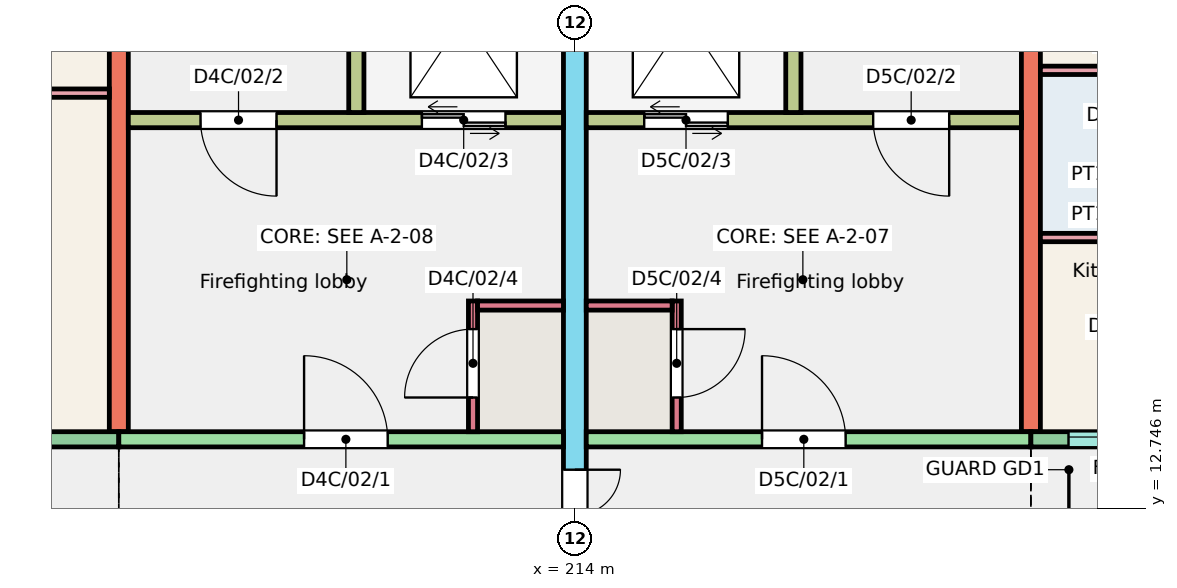
"""IFC4 building model, lengths in metres.
Left out: names, types, materials, properties, quantities, classifications, styles, units other than length and angle.
Written with IfcOpenShell. Run it as: python <this file> out.ifc"""

import sys

from ifc_helpers import new_model, si_unit, direction, frame, frame_2d, origin, place, context, subcontext, project, spatial, rectangle, extrude, element, fill, save


model = new_model("IFC4")
c1 = context("Model", 3, precision=1e-05, world=origin(), true_north=direction((0.0, 1.0)))
c2 = subcontext(c1, "Body", "Model", "MODEL_VIEW")
j1 = project(units=[si_unit("LENGTHUNIT", "METRE"), si_unit("PLANEANGLEUNIT", "RADIAN")], contexts=[c1])
p1 = place(None, origin())
s1 = spatial("IfcSite", under=j1, at=p1, CompositionType="ELEMENT")
p2 = place(p1, origin())
s2 = spatial("IfcBuilding", under=s1, at=p2, CompositionType="ELEMENT")
p3 = place(p2, frame((0.0, 0.0, 6.0)))
s3 = spatial("IfcBuildingStorey", under=s2, at=p3, CompositionType="ELEMENT", Elevation=6.0)
p4 = place(p3, frame((208.0, 13.75, 0.0), z_axis=(0.0, 0.0, 1.0), x_axis=(0.0, 1.0, 0.0)))
e1 = element("IfcWall", 1, at=p4, inside=s3, PredefinedType="SHEAR", context=c2, shape_type="SweptSolid", body=[
    extrude(rectangle(XDim=9.0, YDim=0.25, at=frame_2d((4.5, 0.0))), origin(), (0.0, 0.0, 1.0), 3.0),
])
p5 = place(p3, frame((214.0, 11.75, 0.0), z_axis=(0.0, 0.0, 1.0), x_axis=(0.0, 1.0, 0.0)))
e2 = element("IfcWall", 2, at=p5, inside=s3, PredefinedType="SHEAR", context=c2, shape_type="SweptSolid", body=[
    extrude(rectangle(XDim=11.0, YDim=0.3, at=frame_2d((5.5, 0.0))), origin(), (0.0, 0.0, 1.0), 3.0),
])
p6 = place(p5, frame((0.3, 0.0, 0.0)))
e3 = element("IfcOpeningElement", 3, at=p6, cuts=e2, PredefinedType="OPENING", context=c2, shape_type="SweptSolid", body=[
    extrude(rectangle(XDim=1.2, YDim=2.1, at=frame_2d((0.6, 1.05))), frame((0.0, 0.16, 0.0), z_axis=(0.0, -1.0, 0.0), x_axis=(1.0, 0.0, 0.0)), (0.0, 0.0, 1.0), 0.32),
])
p7 = place(p3, frame((220.0, 13.75, 0.0), z_axis=(0.0, 0.0, 1.0), x_axis=(0.0, 1.0, 0.0)))
e4 = element("IfcWall", 4, at=p7, inside=s3, PredefinedType="SHEAR", context=c2, shape_type="SweptSolid", body=[
    extrude(rectangle(XDim=9.0, YDim=0.25, at=frame_2d((4.5, 0.0))), origin(), (0.0, 0.0, 1.0), 3.0),
])
p8 = place(p3, frame((204.4, 13.65, 0.0), z_axis=(0.0, 0.0, 1.0), x_axis=(1.0, 0.0, 0.0)))
e5 = element("IfcWall", 5, at=p8, inside=s3, PredefinedType="SOLIDWALL", context=c2, shape_type="SweptSolid", body=[
    extrude(rectangle(XDim=3.6, YDim=0.2, at=frame_2d((1.8, 0.0))), origin(), (0.0, 0.0, 1.0), 3.0),
])
p9 = place(p8, frame((0.9, 0.0, 1.1)))
e6 = element("IfcOpeningElement", 6, at=p9, cuts=e5, PredefinedType="OPENING", context=c2, shape_type="SweptSolid", body=[
    extrude(rectangle(XDim=1.8, YDim=1.3, at=frame_2d((0.9, 0.65))), frame((0.0, 0.11, 0.0), z_axis=(0.0, -1.0, 0.0), x_axis=(1.0, 0.0, 0.0)), (0.0, 0.0, 1.0), 0.22),
])
p10 = place(p3, frame((208.0, 13.65, 0.0), z_axis=(0.0, 0.0, 1.0), x_axis=(1.0, 0.0, 0.0)))
e7 = element("IfcWall", 7, at=p10, inside=s3, PredefinedType="SHEAR", context=c2, shape_type="SweptSolid", body=[
    extrude(rectangle(XDim=5.85, YDim=0.2, at=frame_2d((2.925, 0.0))), origin(), (0.0, 0.0, 1.0), 3.0),
])
p11 = place(p10, frame((2.438, 0.0, 0.0)))
e8 = element("IfcOpeningElement", 8, at=p11, cuts=e7, PredefinedType="OPENING", context=c2, shape_type="SweptSolid", body=[
    extrude(rectangle(XDim=1.1, YDim=2.1, at=frame_2d((0.55, 1.05))), frame((0.0, 0.11, 0.0), z_axis=(0.0, -1.0, 0.0), x_axis=(1.0, 0.0, 0.0)), (0.0, 0.0, 1.0), 0.22),
])
p12 = place(p3, frame((208.125, 17.85, 0.0), z_axis=(0.0, 0.0, 1.0), x_axis=(1.0, 0.0, 0.0)))
e9 = element("IfcWall", 9, at=p12, inside=s3, PredefinedType="SHEAR", context=c2, shape_type="SweptSolid", body=[
    extrude(rectangle(XDim=5.725, YDim=0.2, at=frame_2d((2.863, 0.0))), origin(), (0.0, 0.0, 1.0), 3.0),
])
p13 = place(p12, frame((0.95, 0.0, 0.0)))
e10 = element("IfcOpeningElement", 10, at=p13, cuts=e9, PredefinedType="OPENING", context=c2, shape_type="SweptSolid", body=[
    extrude(rectangle(XDim=1.0, YDim=2.1, at=frame_2d((0.5, 1.05))), frame((0.0, 0.11, 0.0), z_axis=(0.0, -1.0, 0.0), x_axis=(1.0, 0.0, 0.0)), (0.0, 0.0, 1.0), 0.22),
])
p14 = place(p12, frame((3.863, 0.0, 0.0)))
e11 = element("IfcOpeningElement", 11, at=p14, cuts=e9, PredefinedType="OPENING", context=c2, shape_type="SweptSolid", body=[
    extrude(rectangle(XDim=1.1, YDim=2.1, at=frame_2d((0.55, 1.05))), frame((0.0, 0.11, 0.0), z_axis=(0.0, -1.0, 0.0), x_axis=(1.0, 0.0, 0.0)), (0.0, 0.0, 1.0), 0.22),
])
p15 = place(p3, frame((211.125, 17.95, 0.0), z_axis=(0.0, 0.0, 1.0), x_axis=(0.0, 1.0, 0.0)))
e12 = element("IfcWall", 12, at=p15, inside=s3, PredefinedType="SHEAR", context=c2, shape_type="SweptSolid", body=[
    extrude(rectangle(XDim=4.8, YDim=0.2, at=frame_2d((2.4, 0.0))), origin(), (0.0, 0.0, 1.0), 3.0),
])
p16 = place(p3, frame((212.66, 13.75, 0.0), z_axis=(0.0, 0.0, 1.0), x_axis=(0.0, 1.0, 0.0)))
e13 = element("IfcWall", 13, at=p16, inside=s3, PredefinedType="SHEAR", context=c2, shape_type="SweptSolid", body=[
    extrude(rectangle(XDim=1.72, YDim=0.12, at=frame_2d((0.86, 0.0))), origin(), (0.0, 0.0, 1.0), 3.0),
])
p17 = place(p16, frame((0.45, 0.0, 0.0)))
e14 = element("IfcOpeningElement", 14, at=p17, cuts=e13, PredefinedType="OPENING", context=c2, shape_type="SweptSolid", body=[
    extrude(rectangle(XDim=0.9, YDim=2.1, at=frame_2d((0.45, 1.05))), frame((0.0, 0.07, 0.0), z_axis=(0.0, -1.0, 0.0), x_axis=(1.0, 0.0, 0.0)), (0.0, 0.0, 1.0), 0.14),
])
p18 = place(p3, frame((212.72, 15.41, 0.0), z_axis=(0.0, 0.0, 1.0), x_axis=(1.0, 0.0, 0.0)))
e15 = element("IfcWall", 15, at=p18, inside=s3, PredefinedType="SHEAR", context=c2, shape_type="SweptSolid", body=[
    extrude(rectangle(XDim=1.13, YDim=0.12, at=frame_2d((0.565, 0.0))), origin(), (0.0, 0.0, 1.0), 3.0),
])
p19 = place(p3, frame((214.15, 13.65, 0.0), z_axis=(0.0, 0.0, 1.0), x_axis=(1.0, 0.0, 0.0)))
e16 = element("IfcWall", 16, at=p19, inside=s3, PredefinedType="SHEAR", context=c2, shape_type="SweptSolid", body=[
    extrude(rectangle(XDim=5.85, YDim=0.2, at=frame_2d((2.925, 0.0))), origin(), (0.0, 0.0, 1.0), 3.0),
])
p20 = place(p19, frame((2.312, 0.0, 0.0)))
e17 = element("IfcOpeningElement", 17, at=p20, cuts=e16, PredefinedType="OPENING", context=c2, shape_type="SweptSolid", body=[
    extrude(rectangle(XDim=1.1, YDim=2.1, at=frame_2d((0.55, 1.05))), frame((0.0, 0.11, 0.0), z_axis=(0.0, -1.0, 0.0), x_axis=(1.0, 0.0, 0.0)), (0.0, 0.0, 1.0), 0.22),
])
p21 = place(p3, frame((214.15, 17.85, 0.0), z_axis=(0.0, 0.0, 1.0), x_axis=(1.0, 0.0, 0.0)))
e18 = element("IfcWall", 18, at=p21, inside=s3, PredefinedType="SHEAR", context=c2, shape_type="SweptSolid", body=[
    extrude(rectangle(XDim=5.725, YDim=0.2, at=frame_2d((2.863, 0.0))), origin(), (0.0, 0.0, 1.0), 3.0),
])
p22 = place(p21, frame((3.775, 0.0, 0.0)))
e19 = element("IfcOpeningElement", 19, at=p22, cuts=e18, PredefinedType="OPENING", context=c2, shape_type="SweptSolid", body=[
    extrude(rectangle(XDim=1.0, YDim=2.1, at=frame_2d((0.5, 1.05))), frame((0.0, 0.11, 0.0), z_axis=(0.0, -1.0, 0.0), x_axis=(1.0, 0.0, 0.0)), (0.0, 0.0, 1.0), 0.22),
])
p23 = place(p21, frame((0.762, 0.0, 0.0)))
e20 = element("IfcOpeningElement", 20, at=p23, cuts=e18, PredefinedType="OPENING", context=c2, shape_type="SweptSolid", body=[
    extrude(rectangle(XDim=1.1, YDim=2.1, at=frame_2d((0.55, 1.05))), frame((0.0, 0.11, 0.0), z_axis=(0.0, -1.0, 0.0), x_axis=(1.0, 0.0, 0.0)), (0.0, 0.0, 1.0), 0.22),
])
p24 = place(p3, frame((216.875, 17.95, 0.0), z_axis=(0.0, 0.0, 1.0), x_axis=(0.0, 1.0, 0.0)))
e21 = element("IfcWall", 21, at=p24, inside=s3, PredefinedType="SHEAR", context=c2, shape_type="SweptSolid", body=[
    extrude(rectangle(XDim=4.8, YDim=0.2, at=frame_2d((2.4, 0.0))), origin(), (0.0, 0.0, 1.0), 3.0),
])
p25 = place(p3, frame((215.34, 13.75, 0.0), z_axis=(0.0, 0.0, 1.0), x_axis=(0.0, 1.0, 0.0)))
e22 = element("IfcWall", 22, at=p25, inside=s3, PredefinedType="SHEAR", context=c2, shape_type="SweptSolid", body=[
    extrude(rectangle(XDim=1.72, YDim=0.12, at=frame_2d((0.86, 0.0))), origin(), (0.0, 0.0, 1.0), 3.0),
])
p26 = place(p25, frame((0.45, 0.0, 0.0)))
e23 = element("IfcOpeningElement", 23, at=p26, cuts=e22, PredefinedType="OPENING", context=c2, shape_type="SweptSolid", body=[
    extrude(rectangle(XDim=0.9, YDim=2.1, at=frame_2d((0.45, 1.05))), frame((0.0, 0.07, 0.0), z_axis=(0.0, -1.0, 0.0), x_axis=(1.0, 0.0, 0.0)), (0.0, 0.0, 1.0), 0.14),
])
p27 = place(p3, frame((214.15, 15.41, 0.0), z_axis=(0.0, 0.0, 1.0), x_axis=(1.0, 0.0, 0.0)))
e24 = element("IfcWall", 24, at=p27, inside=s3, PredefinedType="SHEAR", context=c2, shape_type="SweptSolid", body=[
    extrude(rectangle(XDim=1.13, YDim=0.12, at=frame_2d((0.565, 0.0))), origin(), (0.0, 0.0, 1.0), 3.0),
])
p28 = place(p3, frame((220.0, 13.65, 0.0), z_axis=(0.0, 0.0, 1.0), x_axis=(1.0, 0.0, 0.0)))
e25 = element("IfcWall", 25, at=p28, inside=s3, PredefinedType="SOLIDWALL", context=c2, shape_type="SweptSolid", body=[
    extrude(rectangle(XDim=3.6, YDim=0.2, at=frame_2d((1.8, 0.0))), origin(), (0.0, 0.0, 1.0), 3.0),
])
p29 = place(p28, frame((0.495, 0.0, 1.1)))
e26 = element("IfcOpeningElement", 26, at=p29, cuts=e25, PredefinedType="OPENING", context=c2, shape_type="SweptSolid", body=[
    extrude(rectangle(XDim=1.2, YDim=1.3, at=frame_2d((0.6, 0.65))), frame((0.0, 0.11, 0.0), z_axis=(0.0, -1.0, 0.0), x_axis=(1.0, 0.0, 0.0)), (0.0, 0.0, 1.0), 0.22),
])
p30 = place(p28, frame((2.325, 0.0, 0.0)))
e27 = element("IfcOpeningElement", 27, at=p30, cuts=e25, PredefinedType="OPENING", context=c2, shape_type="SweptSolid", body=[
    extrude(rectangle(XDim=1.0, YDim=2.1, at=frame_2d((0.5, 1.05))), frame((0.0, 0.11, 0.0), z_axis=(0.0, -1.0, 0.0), x_axis=(1.0, 0.0, 0.0)), (0.0, 0.0, 1.0), 0.22),
])
p31 = place(p3, frame((204.525, 18.205, 0.0), z_axis=(0.0, 0.0, 1.0), x_axis=(1.0, 0.0, 0.0)))
e28 = element("IfcWall", 28, at=p31, inside=s3, PredefinedType="PARTITIONING", context=c2, shape_type="SweptSolid", body=[
    extrude(rectangle(XDim=3.35, YDim=0.11, at=frame_2d((1.675, 0.0))), origin(), (0.0, 0.0, 1.0), 2.8),
])
p32 = place(p3, frame((220.125, 16.305, 0.0), z_axis=(0.0, 0.0, 1.0), x_axis=(1.0, 0.0, 0.0)))
e29 = element("IfcWall", 29, at=p32, inside=s3, PredefinedType="PARTITIONING", context=c2, shape_type="SweptSolid", body=[
    extrude(rectangle(XDim=1.94, YDim=0.11, at=frame_2d((0.97, 0.0))), origin(), (0.0, 0.0, 1.0), 2.8),
])
p33 = place(p3, frame((220.125, 18.505, 0.0), z_axis=(0.0, 0.0, 1.0), x_axis=(1.0, 0.0, 0.0)))
e30 = element("IfcWall", 30, at=p33, inside=s3, PredefinedType="PARTITIONING", context=c2, shape_type="SweptSolid", body=[
    extrude(rectangle(XDim=3.35, YDim=0.11, at=frame_2d((1.675, 0.0))), origin(), (0.0, 0.0, 1.0), 2.8),
])
p34 = place(p33, frame((2.25, 0.0, 0.0)))
e31 = element("IfcOpeningElement", 31, at=p34, cuts=e30, PredefinedType="OPENING", context=c2, shape_type="SweptSolid", body=[
    extrude(rectangle(XDim=0.9, YDim=2.1, at=frame_2d((0.45, 1.05))), frame((0.0, 0.065, 0.0), z_axis=(0.0, -1.0, 0.0), x_axis=(1.0, 0.0, 0.0)), (0.0, 0.0, 1.0), 0.13),
])
p35 = place(p29, origin())
e32 = element("IfcWindow", 32, at=p35, inside=s3, PartitioningType="SINGLE_PANEL", PredefinedType="WINDOW", context=c2, shape_type="SweptSolid", body=[
    extrude(rectangle(XDim=1.2, YDim=1.3, at=frame_2d((0.6, 0.65))), frame((0.0, 0.06, 0.0), z_axis=(0.0, -1.0, 0.0), x_axis=(1.0, 0.0, 0.0)), (0.0, 0.0, 1.0), 0.06),
])
fill(e26, e32)
p36 = place(p11, origin())
e33 = element("IfcDoor", 33, at=p36, inside=s3, OperationType="SINGLE_SWING_LEFT", PredefinedType="DOOR", context=c2, shape_type="SweptSolid", body=[
    extrude(rectangle(XDim=1.1, YDim=2.1, at=frame_2d((0.55, 1.05))), frame((0.0, 0.025, 0.0), z_axis=(0.0, -1.0, 0.0), x_axis=(1.0, 0.0, 0.0)), (0.0, 0.0, 1.0), 0.05),
])
fill(e8, e33)
p37 = place(p13, origin())
e34 = element("IfcDoor", 34, at=p37, inside=s3, OperationType="SINGLE_SWING_RIGHT", PredefinedType="DOOR", context=c2, shape_type="SweptSolid", body=[
    extrude(rectangle(XDim=1.0, YDim=2.1, at=frame_2d((0.5, 1.05))), frame((0.0, 0.025, 0.0), z_axis=(0.0, -1.0, 0.0), x_axis=(1.0, 0.0, 0.0)), (0.0, 0.0, 1.0), 0.05),
])
fill(e10, e34)
p38 = place(p14, origin())
e35 = element("IfcDoor", 35, at=p38, inside=s3, OperationType="DOUBLE_DOOR_SLIDING", PredefinedType="DOOR", context=c2, shape_type="SweptSolid", body=[
    extrude(rectangle(XDim=1.1, YDim=2.1, at=frame_2d((0.55, 1.05))), frame((0.0, 0.025, 0.0), z_axis=(0.0, -1.0, 0.0), x_axis=(1.0, 0.0, 0.0)), (0.0, 0.0, 1.0), 0.05),
])
fill(e11, e35)
p39 = place(p17, origin())
e36 = element("IfcDoor", 36, at=p39, inside=s3, OperationType="SINGLE_SWING_LEFT", PredefinedType="DOOR", context=c2, shape_type="SweptSolid", body=[
    extrude(rectangle(XDim=0.9, YDim=2.1, at=frame_2d((0.45, 1.05))), frame((0.0, 0.025, 0.0), z_axis=(0.0, -1.0, 0.0), x_axis=(1.0, 0.0, 0.0)), (0.0, 0.0, 1.0), 0.05),
])
fill(e14, e36)
p40 = place(p20, origin())
e37 = element("IfcDoor", 37, at=p40, inside=s3, OperationType="SINGLE_SWING_LEFT", PredefinedType="DOOR", context=c2, shape_type="SweptSolid", body=[
    extrude(rectangle(XDim=1.1, YDim=2.1, at=frame_2d((0.55, 1.05))), frame((0.0, 0.025, 0.0), z_axis=(0.0, -1.0, 0.0), x_axis=(1.0, 0.0, 0.0)), (0.0, 0.0, 1.0), 0.05),
])
fill(e17, e37)
p41 = place(p22, origin())
e38 = element("IfcDoor", 38, at=p41, inside=s3, OperationType="SINGLE_SWING_RIGHT", PredefinedType="DOOR", context=c2, shape_type="SweptSolid", body=[
    extrude(rectangle(XDim=1.0, YDim=2.1, at=frame_2d((0.5, 1.05))), frame((0.0, 0.025, 0.0), z_axis=(0.0, -1.0, 0.0), x_axis=(1.0, 0.0, 0.0)), (0.0, 0.0, 1.0), 0.05),
])
fill(e19, e38)
p42 = place(p23, origin())
e39 = element("IfcDoor", 39, at=p42, inside=s3, OperationType="DOUBLE_DOOR_SLIDING", PredefinedType="DOOR", context=c2, shape_type="SweptSolid", body=[
    extrude(rectangle(XDim=1.1, YDim=2.1, at=frame_2d((0.55, 1.05))), frame((0.0, 0.025, 0.0), z_axis=(0.0, -1.0, 0.0), x_axis=(1.0, 0.0, 0.0)), (0.0, 0.0, 1.0), 0.05),
])
fill(e20, e39)
p43 = place(p26, origin())
e40 = element("IfcDoor", 40, at=p43, inside=s3, OperationType="SINGLE_SWING_RIGHT", PredefinedType="DOOR", context=c2, shape_type="SweptSolid", body=[
    extrude(rectangle(XDim=0.9, YDim=2.1, at=frame_2d((0.45, 1.05))), frame((0.0, 0.025, 0.0), z_axis=(0.0, -1.0, 0.0), x_axis=(1.0, 0.0, 0.0)), (0.0, 0.0, 1.0), 0.05),
])
fill(e23, e40)
p44 = place(p6, origin())
e41 = element("IfcDoor", 41, at=p44, inside=s3, OperationType="DOUBLE_DOOR_SINGLE_SWING", PredefinedType="DOOR", context=c2, shape_type="SweptSolid", body=[
    extrude(rectangle(XDim=1.2, YDim=2.1, at=frame_2d((0.6, 1.05))), frame((0.0, 0.025, 0.0), z_axis=(0.0, -1.0, 0.0), x_axis=(1.0, 0.0, 0.0)), (0.0, 0.0, 1.0), 0.05),
])
fill(e3, e41)
save(model, sys.argv[1])
